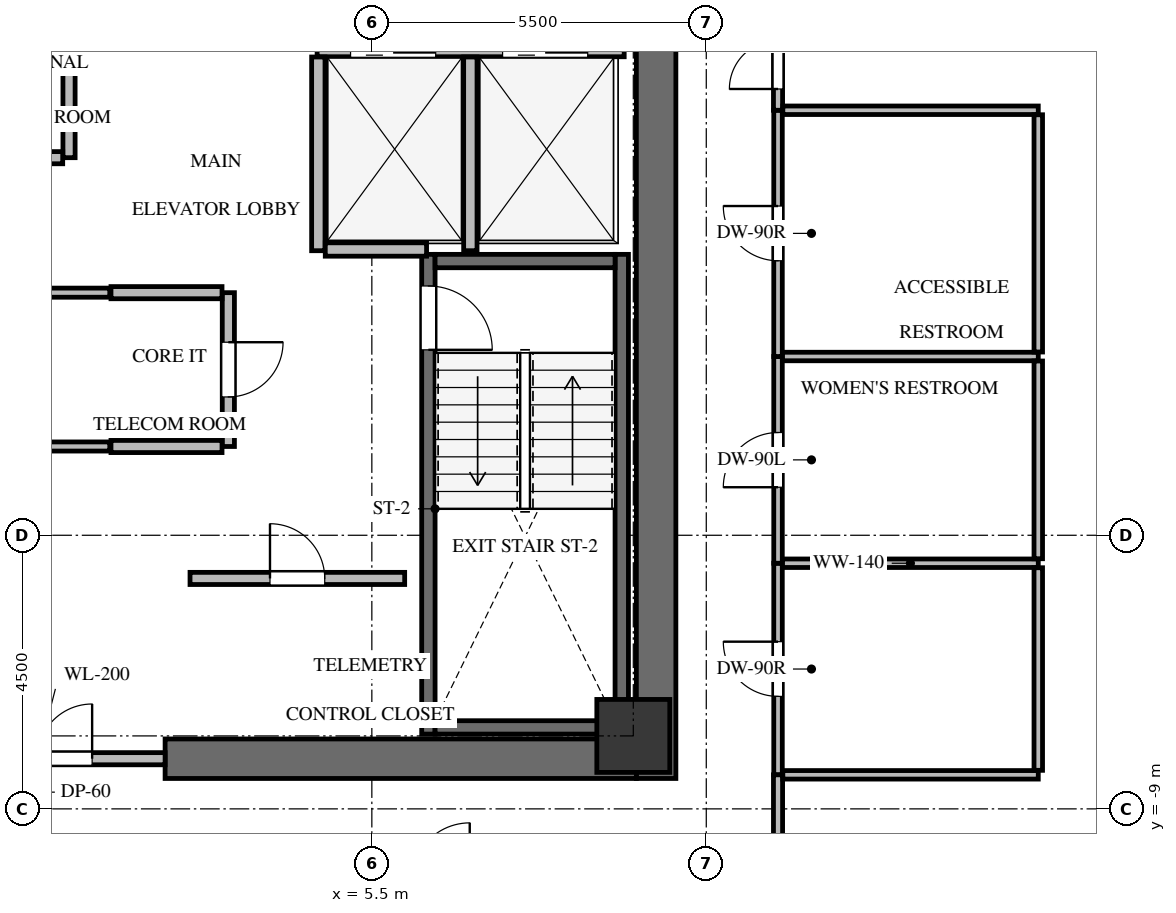
"""IFC4 building model, lengths in metres.
Left out: names, types, materials, properties, quantities, classifications, styles, units other than length and angle.
Written with IfcOpenShell. Run it as: python <this file> out.ifc"""

import sys

from ifc_helpers import new_model, si_unit, direction, frame, frame_2d, origin, origin_2d, place, context, subcontext, project, spatial, rectangle, extrude, source, transform, mapped, element, fill, save


model = new_model("IFC4")
c1 = context("Model", 3, precision=1e-05, world=origin(), true_north=direction((0.0, 1.0)))
c2 = subcontext(c1, "Body", "Model", "MODEL_VIEW")
j1 = project(units=[si_unit("LENGTHUNIT", "METRE"), si_unit("PLANEANGLEUNIT", "RADIAN")], contexts=[c1])
p1 = place(None, origin())
s1 = spatial("IfcSite", under=j1, at=p1, CompositionType="ELEMENT")
p2 = place(p1, origin())
s2 = spatial("IfcBuilding", under=s1, at=p2, CompositionType="ELEMENT")
p3 = place(p2, frame((0.0, 0.0, 167.2)))
s3 = spatial("IfcBuildingStorey", under=s2, at=p3, CompositionType="ELEMENT", Elevation=167.2)
p4 = place(p3, frame((10.175, -8.5, 0.0), z_axis=(0.0, 0.0, 1.0), x_axis=(0.0, 1.0, 0.0)))
e1 = element("IfcWall", 1, at=p4, inside=s3, PredefinedType="SHEAR", context=c2, shape_type="SweptSolid", body=[
    extrude(rectangle(XDim=17.0, YDim=0.65, at=frame_2d((8.5, 0.0))), origin(), (0.0, 0.0, 1.0), 3.3),
])
p5 = place(p3, frame((2.1, -8.175, 0.0), z_axis=(0.0, 0.0, 1.0), x_axis=(1.0, 0.0, 0.0)))
e2 = element("IfcWall", 2, at=p5, inside=s3, PredefinedType="SHEAR", context=c2, shape_type="SweptSolid", body=[
    extrude(rectangle(XDim=7.75, YDim=0.65, at=frame_2d((3.875, 0.0))), origin(), (0.0, 0.0, 1.0), 3.3),
])
p6 = place(p3, frame((9.61, -7.77, -0.24), z_axis=(0.0, 0.0, 1.0), x_axis=(0.0, 1.0, 0.0)))
e3 = element("IfcWall", 3, at=p6, inside=s3, PredefinedType="SHEAR", context=c2, shape_type="SweptSolid", body=[
    extrude(rectangle(XDim=7.89, YDim=0.22, at=frame_2d((3.945, 0.0))), origin(), (0.0, 0.0, 1.0), 3.3),
])
p7 = place(p3, frame((6.43, 0.12, -0.24), z_axis=(0.0, 0.0, 1.0), x_axis=(0.0, -1.0, 0.0)))
e4 = element("IfcWall", 4, at=p7, inside=s3, PredefinedType="SHEAR", context=c2, shape_type="SweptSolid", body=[
    extrude(rectangle(XDim=7.89, YDim=0.22, at=frame_2d((3.945, 0.0))), origin(), (0.0, 0.0, 1.0), 3.3),
])
p8 = place(p7, frame((0.52, 0.0, 0.0)))
e5 = element("IfcOpeningElement", 5, at=p8, cuts=e4, PredefinedType="OPENING", context=c2, shape_type="SweptSolid", body=[
    extrude(rectangle(XDim=1.05, YDim=2.15, at=frame_2d((0.525, 1.075))), frame((0.0, 0.12, 0.0), z_axis=(0.0, -1.0, 0.0), x_axis=(1.0, 0.0, 0.0)), (0.0, 0.0, 1.0), 0.24),
])
for number, where, z_axis, x_axis in (
    (6, (6.54, -7.66, -0.24), (0.0, 0.0, 1.0), (1.0, 0.0, 0.0)),
    (7, (9.5, 0.01, -0.24), (0.0, 0.0, 1.0), (-1.0, 0.0, 0.0)),
):
    element("IfcWall", number, at=place(p3, frame(where, z_axis=z_axis, x_axis=x_axis)), inside=s3, PredefinedType="SHEAR", context=c2, shape_type="SweptSolid", body=[
        extrude(rectangle(XDim=2.96, YDim=0.22, at=frame_2d((1.48, 0.0))), origin(), (0.0, 0.0, 1.0), 3.3),
    ])
m1 = source(origin(), c2, "Body", "SweptSolid", [
    extrude(rectangle(XDim=1.2, YDim=1.2, at=origin_2d()), origin(), (0.0, 0.0, 1.0), 3.3),
])
p9 = place(p3, frame((9.8, -7.8, -0.24), z_axis=(0.0, 0.0, 1.0), x_axis=(1.0, 0.0, 0.0)))
e8 = element("IfcColumn", 8, at=p9, inside=s3, PredefinedType="COLUMN", context=c2, shape_type="MappedRepresentation", body=[
    mapped(m1, transform((0.0, 0.0, 0.0), x_axis=(1.0, 0.0, 0.0), y_axis=(0.0, 1.0, 0.0), z_axis=(0.0, 0.0, 1.0), scale=1.0)),
])
p10 = place(p3, frame((-2.1, -8.175, 0.0), z_axis=(0.0, 0.0, 1.0), x_axis=(1.0, 0.0, 0.0)))
e9 = element("IfcWall", 9, at=p10, inside=s3, PredefinedType="SOLIDWALL", context=c2, shape_type="SweptSolid", body=[
    extrude(rectangle(XDim=4.2, YDim=0.2, at=frame_2d((2.1, 0.0))), origin(), (0.0, 0.0, 1.0), 3.045),
])
p11 = place(p10, frame((1.2, 0.0, 0.0)))
e10 = element("IfcOpeningElement", 10, at=p11, cuts=e9, PredefinedType="OPENING", context=c2, shape_type="SweptSolid", body=[
    extrude(rectangle(XDim=1.8, YDim=2.15, at=frame_2d((0.9, 1.075))), frame((0.0, 0.11, 0.0), z_axis=(0.0, -1.0, 0.0), x_axis=(1.0, 0.0, 0.0)), (0.0, 0.0, 1.0), 0.22),
])
p12 = place(p3, frame((4.6, 3.48, 0.0), z_axis=(0.0, 0.0, 1.0), x_axis=(1.0, 0.0, 0.0)))
e11 = element("IfcWall", 11, at=p12, inside=s3, PredefinedType="SOLIDWALL", context=c2, shape_type="SweptSolid", body=[
    extrude(rectangle(XDim=5.05, YDim=0.22, at=frame_2d((2.525, 0.0))), origin(), (0.0, 0.0, 1.0), 3.045),
])
p13 = place(p12, frame((0.55, 0.0, 0.0)))
e12 = element("IfcOpeningElement", 12, at=p13, cuts=e11, PredefinedType="OPENING", context=c2, shape_type="SweptSolid", body=[
    extrude(rectangle(XDim=1.4, YDim=2.15, at=frame_2d((0.7, 1.075))), frame((0.0, 0.12, 0.0), z_axis=(0.0, -1.0, 0.0), x_axis=(1.0, 0.0, 0.0)), (0.0, 0.0, 1.0), 0.24),
])
p14 = place(p12, frame((3.05, 0.0, 0.0)))
e13 = element("IfcOpeningElement", 13, at=p14, cuts=e11, PredefinedType="OPENING", context=c2, shape_type="SweptSolid", body=[
    extrude(rectangle(XDim=1.4, YDim=2.15, at=frame_2d((0.7, 1.075))), frame((0.0, 0.12, 0.0), z_axis=(0.0, -1.0, 0.0), x_axis=(1.0, 0.0, 0.0)), (0.0, 0.0, 1.0), 0.24),
])
for number, where, z_axis, x_axis in (
    (14, (4.62, 0.18, 0.0), (0.0, 0.0, 1.0), (0.0, 1.0, 0.0)),
    (15, (7.12, 0.18, 0.0), (0.0, 0.0, 1.0), (0.0, 1.0, 0.0)),
):
    element("IfcWall", number, at=place(p3, frame(where, z_axis=z_axis, x_axis=x_axis)), inside=s3, PredefinedType="SOLIDWALL", context=c2, shape_type="SweptSolid", body=[
        extrude(rectangle(XDim=3.186, YDim=0.22, at=frame_2d((1.593, 0.0))), origin(), (0.0, 0.0, 1.0), 3.045),
    ])
p15 = place(p3, frame((4.734, 0.2, 0.0), z_axis=(0.0, 0.0, 1.0), x_axis=(1.0, 0.0, 0.0)))
e16 = element("IfcWall", 16, at=p15, inside=s3, PredefinedType="SOLIDWALL", context=c2, shape_type="SweptSolid", body=[
    extrude(rectangle(XDim=1.666, YDim=0.22, at=frame_2d((0.833, 0.0))), origin(), (0.0, 0.0, 1.0), 3.045),
])
p16 = place(p3, frame((2.51, -5.21, 0.0), z_axis=(0.0, 0.0, 1.0), x_axis=(1.0, 0.0, 0.0)))
e17 = element("IfcWall", 17, at=p16, inside=s3, PredefinedType="SOLIDWALL", context=c2, shape_type="SweptSolid", body=[
    extrude(rectangle(XDim=3.53, YDim=0.2, at=frame_2d((1.765, 0.0))), origin(), (0.0, 0.0, 1.0), 3.045),
])
p17 = place(p16, frame((1.315, 0.0, 0.0)))
e18 = element("IfcOpeningElement", 18, at=p17, cuts=e17, PredefinedType="OPENING", context=c2, shape_type="SweptSolid", body=[
    extrude(rectangle(XDim=0.9, YDim=2.05, at=frame_2d((0.45, 1.025))), frame((0.0, 0.11, 0.0), z_axis=(0.0, -1.0, 0.0), x_axis=(1.0, 0.0, 0.0)), (0.0, 0.0, 1.0), 0.22),
])
p18 = place(p3, frame((1.19, -3.04, 0.0), z_axis=(0.0, 0.0, 1.0), x_axis=(-1.0, 0.0, 0.0)))
e19 = element("IfcWall", 19, at=p18, inside=s3, PredefinedType="PARTITIONING", context=c2, shape_type="SweptSolid", body=[
    extrude(rectangle(XDim=5.53, YDim=0.15, at=frame_2d((2.765, 0.0))), origin(), (0.0, 0.0, 1.0), 3.045),
])
p19 = place(p18, frame((2.315, 0.0, 0.0)))
e20 = element("IfcOpeningElement", 20, at=p19, cuts=e19, PredefinedType="OPENING", context=c2, shape_type="SweptSolid", body=[
    extrude(rectangle(XDim=0.9, YDim=2.05, at=frame_2d((0.45, 1.025))), frame((0.0, 0.085, 0.0), z_axis=(0.0, -1.0, 0.0), x_axis=(1.0, 0.0, 0.0)), (0.0, 0.0, 1.0), 0.17),
])
p20 = place(p3, frame((-4.34, -0.51, 0.0), z_axis=(0.0, 0.0, 1.0), x_axis=(1.0, 0.0, 0.0)))
e21 = element("IfcWall", 21, at=p20, inside=s3, PredefinedType="PARTITIONING", context=c2, shape_type="SweptSolid", body=[
    extrude(rectangle(XDim=5.53, YDim=0.15, at=frame_2d((2.765, 0.0))), origin(), (0.0, 0.0, 1.0), 3.045),
])
p21 = place(p3, frame((3.14, -0.51, 0.0), z_axis=(0.0, 0.0, 1.0), x_axis=(0.0, -1.0, 0.0)))
e22 = element("IfcWall", 22, at=p21, inside=s3, PredefinedType="SOLIDWALL", context=c2, shape_type="SweptSolid", body=[
    extrude(rectangle(XDim=2.53, YDim=0.2, at=frame_2d((1.265, 0.0))), origin(), (0.0, 0.0, 1.0), 3.045),
])
p22 = place(p21, frame((0.815, 0.0, 0.0)))
e23 = element("IfcOpeningElement", 23, at=p22, cuts=e22, PredefinedType="OPENING", context=c2, shape_type="SweptSolid", body=[
    extrude(rectangle(XDim=0.9, YDim=2.05, at=frame_2d((0.45, 1.025))), frame((0.0, 0.11, 0.0), z_axis=(0.0, -1.0, 0.0), x_axis=(1.0, 0.0, 0.0)), (0.0, 0.0, 1.0), 0.22),
])
for number, where, z_axis, x_axis in (
    (24, (3.036, -3.04, 0.0), (0.0, 0.0, 1.0), (-1.0, 0.0, 0.0)),
    (25, (1.21, -0.51, 0.0), (0.0, 0.0, 1.0), (1.0, 0.0, 0.0)),
):
    element("IfcWall", number, at=place(p3, frame(where, z_axis=z_axis, x_axis=x_axis)), inside=s3, PredefinedType="SOLIDWALL", context=c2, shape_type="SweptSolid", body=[
        extrude(rectangle(XDim=1.826, YDim=0.2, at=frame_2d((0.913, 0.0))), origin(), (0.0, 0.0, 1.0), 3.045),
    ])
p23 = place(p3, frame((0.52, 3.3, 0.0), z_axis=(0.0, 0.0, 1.0), x_axis=(0.0, -1.0, 0.0)))
e26 = element("IfcWall", 26, at=p23, inside=s3, PredefinedType="SOLIDWALL", context=c2, shape_type="SweptSolid", body=[
    extrude(rectangle(XDim=1.59, YDim=0.2, at=frame_2d((0.795, 0.0))), origin(), (0.0, 0.0, 1.0), 3.045),
])
p24 = place(p3, frame((0.416, 1.71, 0.0), z_axis=(0.0, 0.0, 1.0), x_axis=(-1.0, 0.0, 0.0)))
e27 = element("IfcWall", 27, at=p24, inside=s3, PredefinedType="SOLIDWALL", context=c2, shape_type="SweptSolid", body=[
    extrude(rectangle(XDim=1.336, YDim=0.2, at=frame_2d((0.668, 0.0))), origin(), (0.0, 0.0, 1.0), 3.045),
])
p25 = place(p24, frame((0.218, 0.0, 0.0)))
e28 = element("IfcOpeningElement", 28, at=p25, cuts=e27, PredefinedType="OPENING", context=c2, shape_type="SweptSolid", body=[
    extrude(rectangle(XDim=0.9, YDim=2.05, at=frame_2d((0.45, 1.025))), frame((0.0, 0.11, 0.0), z_axis=(0.0, -1.0, 0.0), x_axis=(1.0, 0.0, 0.0)), (0.0, 0.0, 1.0), 0.22),
])
p26 = place(p3, frame((12.18, -8.44, 0.0), z_axis=(0.0, 0.0, 1.0), x_axis=(0.0, 1.0, 0.0)))
e29 = element("IfcWall", 29, at=p26, inside=s3, PredefinedType="PARTITIONING", context=c2, shape_type="SweptSolid", body=[
    extrude(rectangle(XDim=3.48, YDim=0.14, at=frame_2d((1.74, 0.0))), origin(), (0.0, 0.0, 1.0), 3.045),
])
p27 = place(p26, frame((1.29, 0.0, 0.0)))
e30 = element("IfcOpeningElement", 30, at=p27, cuts=e29, PredefinedType="OPENING", context=c2, shape_type="SweptSolid", body=[
    extrude(rectangle(XDim=0.9, YDim=2.05, at=frame_2d((0.45, 1.025))), frame((0.0, 0.08, 0.0), z_axis=(0.0, -1.0, 0.0), x_axis=(1.0, 0.0, 0.0)), (0.0, 0.0, 1.0), 0.16),
])
p28 = place(p3, frame((12.18, -4.96, 0.0), z_axis=(0.0, 0.0, 1.0), x_axis=(0.0, 1.0, 0.0)))
e31 = element("IfcWall", 31, at=p28, inside=s3, PredefinedType="PARTITIONING", context=c2, shape_type="SweptSolid", body=[
    extrude(rectangle(XDim=3.4, YDim=0.14, at=frame_2d((1.7, 0.0))), origin(), (0.0, 0.0, 1.0), 3.045),
])
p29 = place(p28, frame((1.25, 0.0, 0.0)))
e32 = element("IfcOpeningElement", 32, at=p29, cuts=e31, PredefinedType="OPENING", context=c2, shape_type="SweptSolid", body=[
    extrude(rectangle(XDim=0.9, YDim=2.05, at=frame_2d((0.45, 1.025))), frame((0.0, 0.08, 0.0), z_axis=(0.0, -1.0, 0.0), x_axis=(1.0, 0.0, 0.0)), (0.0, 0.0, 1.0), 0.16),
])
p30 = place(p3, frame((12.18, -1.56, 0.0), z_axis=(0.0, 0.0, 1.0), x_axis=(0.0, 1.0, 0.0)))
e33 = element("IfcWall", 33, at=p30, inside=s3, PredefinedType="PARTITIONING", context=c2, shape_type="SweptSolid", body=[
    extrude(rectangle(XDim=4.05, YDim=0.14, at=frame_2d((2.025, 0.0))), origin(), (0.0, 0.0, 1.0), 2.242),
])
p31 = place(p30, frame((1.575, 0.0, 0.0)))
e34 = element("IfcOpeningElement", 34, at=p31, cuts=e33, PredefinedType="OPENING", context=c2, shape_type="SweptSolid", body=[
    extrude(rectangle(XDim=0.9, YDim=2.05, at=frame_2d((0.45, 1.025))), frame((0.0, 0.08, 0.0), z_axis=(0.0, -1.0, 0.0), x_axis=(1.0, 0.0, 0.0)), (0.0, 0.0, 1.0), 0.16),
])
p32 = place(p3, frame((12.18, 2.49, 0.0), z_axis=(0.0, 0.0, 1.0), x_axis=(0.0, 1.0, 0.0)))
e35 = element("IfcWall", 35, at=p32, inside=s3, PredefinedType="PARTITIONING", context=c2, shape_type="SweptSolid", body=[
    extrude(rectangle(XDim=7.611, YDim=0.15, at=frame_2d((3.806, 0.0))), origin(), (0.0, 0.0, 1.0), 3.045),
])
p33 = place(p32, frame((0.35, 0.0, 0.0)))
e36 = element("IfcOpeningElement", 36, at=p33, cuts=e35, PredefinedType="OPENING", context=c2, shape_type="SweptSolid", body=[
    extrude(rectangle(XDim=1.6, YDim=2.15, at=frame_2d((0.8, 1.075))), frame((0.0, 0.085, 0.0), z_axis=(0.0, -1.0, 0.0), x_axis=(1.0, 0.0, 0.0)), (0.0, 0.0, 1.0), 0.17),
])
p34 = place(p3, frame((12.18, -10.101, 0.0), z_axis=(0.0, 0.0, 1.0), x_axis=(0.0, 1.0, 0.0)))
e37 = element("IfcWall", 37, at=p34, inside=s3, PredefinedType="PARTITIONING", context=c2, shape_type="SweptSolid", body=[
    extrude(rectangle(XDim=1.661, YDim=0.15, at=frame_2d((0.831, 0.0))), origin(), (0.0, 0.0, 1.0), 3.045),
])
p35 = place(p3, frame((12.254, -4.96, 0.0), z_axis=(0.0, 0.0, 1.0), x_axis=(1.0, 0.0, 0.0)))
e38 = element("IfcWall", 38, at=p35, inside=s3, PredefinedType="PARTITIONING", context=c2, shape_type="SweptSolid", body=[
    extrude(rectangle(XDim=4.206, YDim=0.14, at=frame_2d((2.103, 0.0))), origin(), (0.0, 0.0, 1.0), 3.045),
])
p36 = place(p3, frame((16.46, -8.44, 0.0), z_axis=(0.0, 0.0, 1.0), x_axis=(-1.0, 0.0, 0.0)))
e39 = element("IfcWall", 39, at=p36, inside=s3, PredefinedType="PARTITIONING", context=c2, shape_type="SweptSolid", body=[
    extrude(rectangle(XDim=4.201, YDim=0.14, at=frame_2d((2.101, 0.0))), origin(), (0.0, 0.0, 1.0), 3.045),
])
p37 = place(p3, frame((16.46, -5.034, 0.0), z_axis=(0.0, 0.0, 1.0), x_axis=(0.0, -1.0, 0.0)))
e40 = element("IfcWall", 40, at=p37, inside=s3, PredefinedType="PARTITIONING", context=c2, shape_type="SweptSolid", body=[
    extrude(rectangle(XDim=3.332, YDim=0.14, at=frame_2d((1.666, 0.0))), origin(), (0.0, 0.0, 1.0), 3.045),
])
p38 = place(p3, frame((12.254, -1.56, 0.0), z_axis=(0.0, 0.0, 1.0), x_axis=(1.0, 0.0, 0.0)))
e41 = element("IfcWall", 41, at=p38, inside=s3, PredefinedType="PARTITIONING", context=c2, shape_type="SweptSolid", body=[
    extrude(rectangle(XDim=4.206, YDim=0.14, at=frame_2d((2.103, 0.0))), origin(), (0.0, 0.0, 1.0), 3.045),
])
p39 = place(p3, frame((16.46, -1.634, 0.0), z_axis=(0.0, 0.0, 1.0), x_axis=(0.0, -1.0, 0.0)))
e42 = element("IfcWall", 42, at=p39, inside=s3, PredefinedType="PARTITIONING", context=c2, shape_type="SweptSolid", body=[
    extrude(rectangle(XDim=3.252, YDim=0.14, at=frame_2d((1.626, 0.0))), origin(), (0.0, 0.0, 1.0), 3.045),
])
p40 = place(p3, frame((12.259, 2.49, 0.0), z_axis=(0.0, 0.0, 1.0), x_axis=(1.0, 0.0, 0.0)))
e43 = element("IfcWall", 43, at=p40, inside=s3, PredefinedType="PARTITIONING", context=c2, shape_type="SweptSolid", body=[
    extrude(rectangle(XDim=4.201, YDim=0.14, at=frame_2d((2.101, 0.0))), origin(), (0.0, 0.0, 1.0), 3.045),
])
p41 = place(p3, frame((16.46, 2.416, 0.0), z_axis=(0.0, 0.0, 1.0), x_axis=(0.0, -1.0, 0.0)))
e44 = element("IfcWall", 44, at=p41, inside=s3, PredefinedType="PARTITIONING", context=c2, shape_type="SweptSolid", body=[
    extrude(rectangle(XDim=3.902, YDim=0.14, at=frame_2d((1.951, 0.0))), origin(), (0.0, 0.0, 1.0), 2.242),
])
m2 = source(origin(), c2, "Body", "SweptSolid", [
    extrude(rectangle(XDim=1.05, YDim=2.15, at=frame_2d((0.525, 1.075))), frame((0.0, 0.025, 0.0), z_axis=(0.0, -1.0, 0.0), x_axis=(1.0, 0.0, 0.0)), (0.0, 0.0, 1.0), 0.05),
])
p42 = place(p8, origin())
e45 = element("IfcDoor", 45, at=p42, inside=s3, OperationType="SINGLE_SWING_RIGHT", PredefinedType="DOOR", context=c2, shape_type="MappedRepresentation", body=[
    mapped(m2, transform((0.0, 0.0, 0.0), x_axis=(1.0, 0.0, 0.0), y_axis=(0.0, 1.0, 0.0), z_axis=(0.0, 0.0, 1.0), scale=1.0)),
])
fill(e5, e45)
m3 = source(origin(), c2, "Body", "SweptSolid", [
    extrude(rectangle(XDim=1.8, YDim=2.15, at=frame_2d((0.9, 1.075))), frame((0.0, 0.025, 0.0), z_axis=(0.0, -1.0, 0.0), x_axis=(1.0, 0.0, 0.0)), (0.0, 0.0, 1.0), 0.05),
])
p43 = place(p11, origin())
e46 = element("IfcDoor", 46, at=p43, inside=s3, OperationType="DOUBLE_DOOR_SINGLE_SWING", PredefinedType="DOOR", context=c2, shape_type="MappedRepresentation", body=[
    mapped(m3, transform((0.0, 0.0, 0.0), x_axis=(1.0, 0.0, 0.0), y_axis=(0.0, 1.0, 0.0), z_axis=(0.0, 0.0, 1.0), scale=1.0)),
])
fill(e10, e46)
m4 = source(origin(), c2, "Body", "SweptSolid", [
    extrude(rectangle(XDim=0.9, YDim=2.05, at=frame_2d((0.45, 1.025))), frame((0.0, 0.025, 0.0), z_axis=(0.0, -1.0, 0.0), x_axis=(1.0, 0.0, 0.0)), (0.0, 0.0, 1.0), 0.05),
])
p44 = place(p17, origin())
e47 = element("IfcDoor", 47, at=p44, inside=s3, OperationType="SINGLE_SWING_LEFT", PredefinedType="DOOR", context=c2, shape_type="MappedRepresentation", body=[
    mapped(m4, transform((0.0, 0.0, 0.0), x_axis=(1.0, 0.0, 0.0), y_axis=(0.0, 1.0, 0.0), z_axis=(0.0, 0.0, 1.0), scale=1.0)),
])
fill(e18, e47)
p45 = place(p22, origin())
e48 = element("IfcDoor", 48, at=p45, inside=s3, OperationType="SINGLE_SWING_LEFT", PredefinedType="DOOR", context=c2, shape_type="MappedRepresentation", body=[
    mapped(m4, transform((0.0, 0.0, 0.0), x_axis=(1.0, 0.0, 0.0), y_axis=(0.0, 1.0, 0.0), z_axis=(0.0, 0.0, 1.0), scale=1.0)),
])
fill(e23, e48)
m5 = source(origin(), c2, "Body", "SweptSolid", [
    extrude(rectangle(XDim=0.9, YDim=2.05, at=frame_2d((0.45, 1.025))), frame((0.0, 0.025, 0.0), z_axis=(0.0, -1.0, 0.0), x_axis=(1.0, 0.0, 0.0)), (0.0, 0.0, 1.0), 0.05),
])
p46 = place(p27, origin())
e49 = element("IfcDoor", 49, at=p46, inside=s3, OperationType="SINGLE_SWING_RIGHT", PredefinedType="DOOR", context=c2, shape_type="MappedRepresentation", body=[
    mapped(m5, transform((0.0, 0.0, 0.0), x_axis=(1.0, 0.0, 0.0), y_axis=(0.0, 1.0, 0.0), z_axis=(0.0, 0.0, 1.0), scale=1.0)),
])
fill(e30, e49)
m6 = source(origin(), c2, "Body", "SweptSolid", [
    extrude(rectangle(XDim=0.9, YDim=2.05, at=frame_2d((0.45, 1.025))), frame((0.0, 0.025, 0.0), z_axis=(0.0, -1.0, 0.0), x_axis=(1.0, 0.0, 0.0)), (0.0, 0.0, 1.0), 0.05),
])
p47 = place(p29, origin())
e50 = element("IfcDoor", 50, at=p47, inside=s3, OperationType="SINGLE_SWING_LEFT", PredefinedType="DOOR", context=c2, shape_type="MappedRepresentation", body=[
    mapped(m6, transform((0.0, 0.0, 0.0), x_axis=(1.0, 0.0, 0.0), y_axis=(0.0, 1.0, 0.0), z_axis=(0.0, 0.0, 1.0), scale=1.0)),
])
fill(e32, e50)
p48 = place(p31, origin())
e51 = element("IfcDoor", 51, at=p48, inside=s3, OperationType="SINGLE_SWING_RIGHT", PredefinedType="DOOR", context=c2, shape_type="MappedRepresentation", body=[
    mapped(m5, transform((0.0, 0.0, 0.0), x_axis=(1.0, 0.0, 0.0), y_axis=(0.0, 1.0, 0.0), z_axis=(0.0, 0.0, 1.0), scale=1.0)),
])
fill(e34, e51)
m7 = source(origin(), c2, "Body", "SweptSolid", [
    extrude(rectangle(XDim=1.6, YDim=2.15, at=frame_2d((0.8, 1.075))), frame((0.0, 0.025, 0.0), z_axis=(0.0, -1.0, 0.0), x_axis=(1.0, 0.0, 0.0)), (0.0, 0.0, 1.0), 0.05),
])
p49 = place(p33, origin())
e52 = element("IfcDoor", 52, at=p49, inside=s3, OperationType="DOUBLE_DOOR_SINGLE_SWING", PredefinedType="DOOR", context=c2, shape_type="MappedRepresentation", body=[
    mapped(m7, transform((0.0, 0.0, 0.0), x_axis=(1.0, 0.0, 0.0), y_axis=(0.0, 1.0, 0.0), z_axis=(0.0, 0.0, 1.0), scale=1.0)),
])
fill(e36, e52)
save(model, sys.argv[1])
